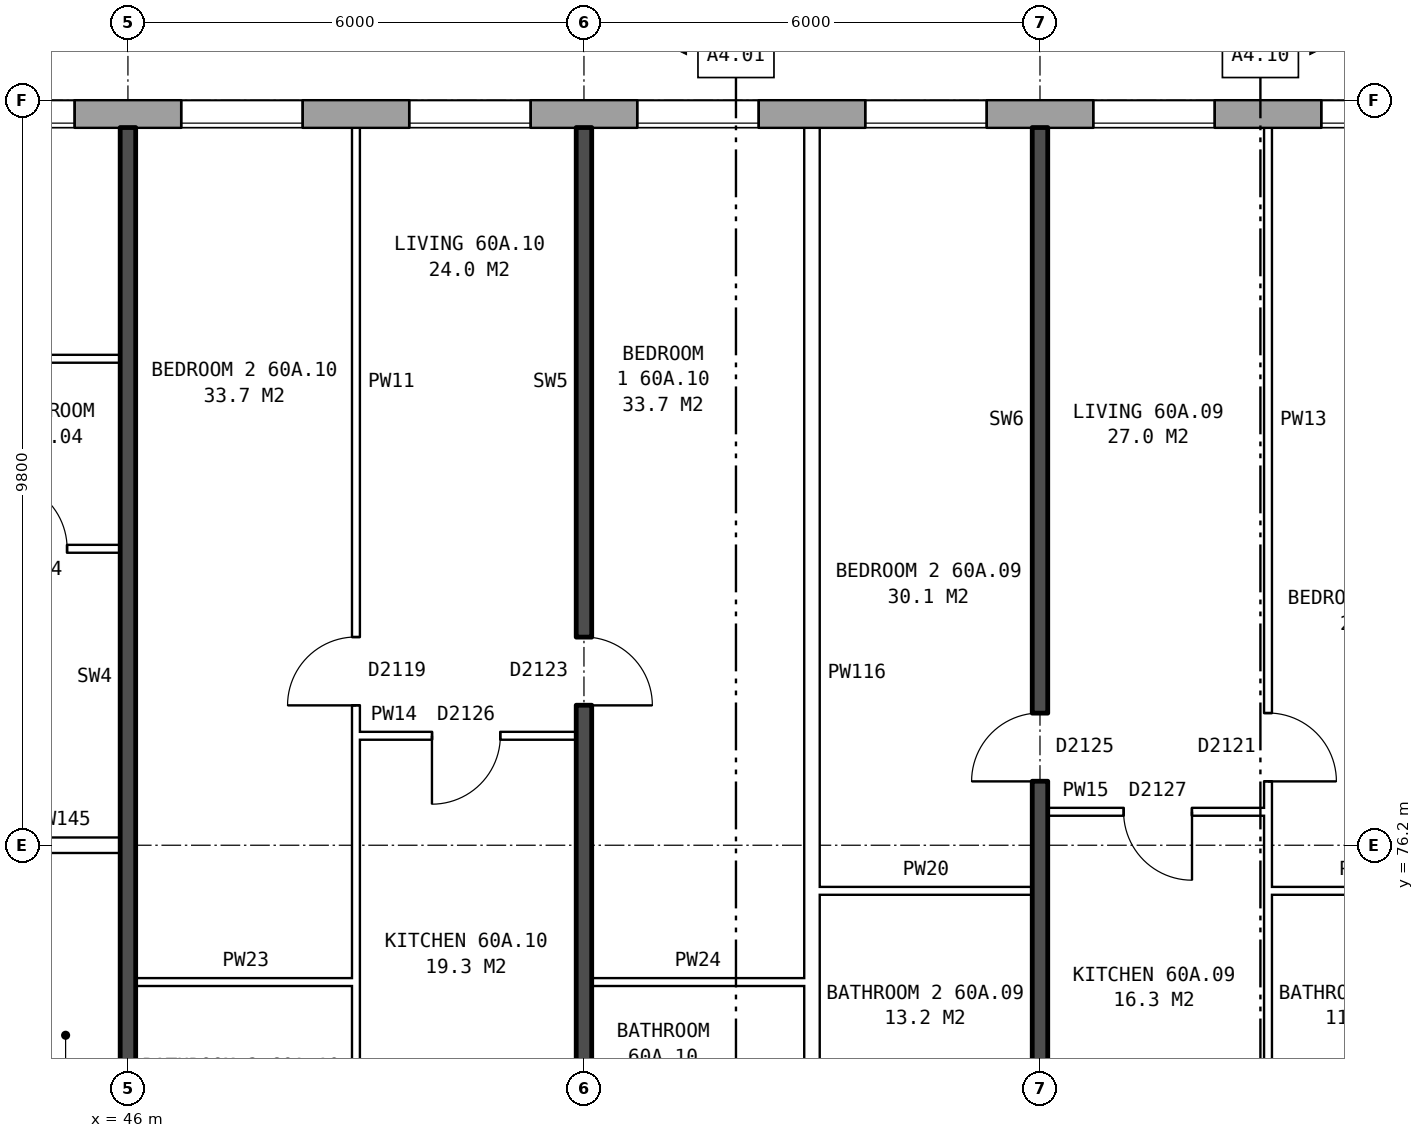
"""IFC4 building model, lengths in metres.
Left out: names, types, materials, properties, quantities, classifications, styles, units other than length and angle.
Written with IfcOpenShell. Run it as: python <this file> out.ifc"""

import sys

from ifc_helpers import new_model, si_unit, direction, frame, frame_2d, origin, place, context, subcontext, project, spatial, rectangle, extrude, element, fill, save


model = new_model("IFC4")
c1 = context("Model", 3, precision=1e-05, world=origin(), true_north=direction((0.0, 1.0)))
c2 = subcontext(c1, "Body", "Model", "MODEL_VIEW")
j1 = project(units=[si_unit("LENGTHUNIT", "METRE"), si_unit("PLANEANGLEUNIT", "RADIAN")], contexts=[c1])
p1 = place(None, origin())
s1 = spatial("IfcSite", under=j1, at=p1, CompositionType="ELEMENT")
p2 = place(p1, origin())
s2 = spatial("IfcBuilding", under=s1, at=p2, CompositionType="ELEMENT")
p3 = place(p2, frame((0.0, 0.0, 212.1)))
s3 = spatial("IfcBuildingStorey", under=s2, at=p3, CompositionType="ELEMENT", Elevation=212.1)
p4 = place(p3, frame((74.95, 85.82, 0.0), z_axis=(0.0, 0.0, 1.0), x_axis=(-1.0, 0.0, 0.0)))
e1 = element("IfcWall", 1, at=p4, inside=s3, PredefinedType="STANDARD", context=c2, shape_type="SweptSolid", body=[
    extrude(rectangle(XDim=39.875, YDim=0.36, at=frame_2d((19.938, 0.0))), origin(), (0.0, 0.0, 1.0), 2.85),
])
p5 = place(p4, frame((2.65, 0.0, 0.8)))
e2 = element("IfcOpeningElement", 2, at=p5, cuts=e1, PredefinedType="OPENING", context=c2, shape_type="SweptSolid", body=[
    extrude(rectangle(XDim=1.6, YDim=1.8, at=frame_2d((0.8, 0.9))), frame((0.0, 0.19, 0.0), z_axis=(0.0, -1.0, 0.0), x_axis=(1.0, 0.0, 0.0)), (0.0, 0.0, 1.0), 0.38),
])
p6 = place(p4, frame((5.15, 0.0, 1.5)))
e3 = element("IfcOpeningElement", 3, at=p6, cuts=e1, PredefinedType="OPENING", context=c2, shape_type="SweptSolid", body=[
    extrude(rectangle(XDim=0.6, YDim=0.9, at=frame_2d((0.3, 0.45))), frame((0.0, 0.19, 0.0), z_axis=(0.0, -1.0, 0.0), x_axis=(1.0, 0.0, 0.0)), (0.0, 0.0, 1.0), 0.38),
])
p7 = place(p4, frame((8.65, 0.0, 0.8)))
e4 = element("IfcOpeningElement", 4, at=p7, cuts=e1, PredefinedType="OPENING", context=c2, shape_type="SweptSolid", body=[
    extrude(rectangle(XDim=1.6, YDim=1.8, at=frame_2d((0.8, 0.9))), frame((0.0, 0.19, 0.0), z_axis=(0.0, -1.0, 0.0), x_axis=(1.0, 0.0, 0.0)), (0.0, 0.0, 1.0), 0.38),
])
p8 = place(p4, frame((11.65, 0.0, 0.8)))
e5 = element("IfcOpeningElement", 5, at=p8, cuts=e1, PredefinedType="OPENING", context=c2, shape_type="SweptSolid", body=[
    extrude(rectangle(XDim=1.6, YDim=1.8, at=frame_2d((0.8, 0.9))), frame((0.0, 0.19, 0.0), z_axis=(0.0, -1.0, 0.0), x_axis=(1.0, 0.0, 0.0)), (0.0, 0.0, 1.0), 0.38),
])
p9 = place(p4, frame((14.65, 0.0, 0.8)))
e6 = element("IfcOpeningElement", 6, at=p9, cuts=e1, PredefinedType="OPENING", context=c2, shape_type="SweptSolid", body=[
    extrude(rectangle(XDim=1.6, YDim=1.8, at=frame_2d((0.8, 0.9))), frame((0.0, 0.19, 0.0), z_axis=(0.0, -1.0, 0.0), x_axis=(1.0, 0.0, 0.0)), (0.0, 0.0, 1.0), 0.38),
])
p10 = place(p4, frame((17.65, 0.0, 0.8)))
e7 = element("IfcOpeningElement", 7, at=p10, cuts=e1, PredefinedType="OPENING", context=c2, shape_type="SweptSolid", body=[
    extrude(rectangle(XDim=1.6, YDim=1.8, at=frame_2d((0.8, 0.9))), frame((0.0, 0.19, 0.0), z_axis=(0.0, -1.0, 0.0), x_axis=(1.0, 0.0, 0.0)), (0.0, 0.0, 1.0), 0.38),
])
p11 = place(p4, frame((20.65, 0.0, 0.8)))
e8 = element("IfcOpeningElement", 8, at=p11, cuts=e1, PredefinedType="OPENING", context=c2, shape_type="SweptSolid", body=[
    extrude(rectangle(XDim=1.6, YDim=1.8, at=frame_2d((0.8, 0.9))), frame((0.0, 0.19, 0.0), z_axis=(0.0, -1.0, 0.0), x_axis=(1.0, 0.0, 0.0)), (0.0, 0.0, 1.0), 0.38),
])
p12 = place(p4, frame((23.65, 0.0, 0.8)))
e9 = element("IfcOpeningElement", 9, at=p12, cuts=e1, PredefinedType="OPENING", context=c2, shape_type="SweptSolid", body=[
    extrude(rectangle(XDim=1.6, YDim=1.8, at=frame_2d((0.8, 0.9))), frame((0.0, 0.19, 0.0), z_axis=(0.0, -1.0, 0.0), x_axis=(1.0, 0.0, 0.0)), (0.0, 0.0, 1.0), 0.38),
])
p13 = place(p4, frame((26.65, 0.0, 0.8)))
e10 = element("IfcOpeningElement", 10, at=p13, cuts=e1, PredefinedType="OPENING", context=c2, shape_type="SweptSolid", body=[
    extrude(rectangle(XDim=1.6, YDim=1.8, at=frame_2d((0.8, 0.9))), frame((0.0, 0.19, 0.0), z_axis=(0.0, -1.0, 0.0), x_axis=(1.0, 0.0, 0.0)), (0.0, 0.0, 1.0), 0.38),
])
p14 = place(p4, frame((29.65, 0.0, 0.8)))
e11 = element("IfcOpeningElement", 11, at=p14, cuts=e1, PredefinedType="OPENING", context=c2, shape_type="SweptSolid", body=[
    extrude(rectangle(XDim=1.6, YDim=1.8, at=frame_2d((0.8, 0.9))), frame((0.0, 0.19, 0.0), z_axis=(0.0, -1.0, 0.0), x_axis=(1.0, 0.0, 0.0)), (0.0, 0.0, 1.0), 0.38),
])
p15 = place(p4, frame((32.65, 0.0, 0.8)))
e12 = element("IfcOpeningElement", 12, at=p15, cuts=e1, PredefinedType="OPENING", context=c2, shape_type="SweptSolid", body=[
    extrude(rectangle(XDim=1.6, YDim=1.8, at=frame_2d((0.8, 0.9))), frame((0.0, 0.19, 0.0), z_axis=(0.0, -1.0, 0.0), x_axis=(1.0, 0.0, 0.0)), (0.0, 0.0, 1.0), 0.38),
])
p16 = place(p4, frame((36.35, 0.0, 1.1)))
e13 = element("IfcOpeningElement", 13, at=p16, cuts=e1, PredefinedType="OPENING", context=c2, shape_type="SweptSolid", body=[
    extrude(rectangle(XDim=0.8, YDim=1.5, at=frame_2d((0.4, 0.75))), frame((0.0, 0.19, 0.0), z_axis=(0.0, -1.0, 0.0), x_axis=(1.0, 0.0, 0.0)), (0.0, 0.0, 1.0), 0.38),
])
p17 = place(p4, frame((7.45, 0.0, 0.8)))
e14 = element("IfcOpeningElement", 14, at=p17, cuts=e1, PredefinedType="OPENING", context=c2, shape_type="SweptSolid", body=[
    extrude(rectangle(XDim=0.8, YDim=1.5, at=frame_2d((0.4, 0.75))), frame((0.0, 0.19, 0.0), z_axis=(0.0, -1.0, 0.0), x_axis=(1.0, 0.0, 0.0)), (0.0, 0.0, 1.0), 0.38),
])
p18 = place(p4, frame((37.45, 0.0, 0.8)))
e15 = element("IfcOpeningElement", 15, at=p18, cuts=e1, PredefinedType="OPENING", context=c2, shape_type="SweptSolid", body=[
    extrude(rectangle(XDim=1.4, YDim=1.8, at=frame_2d((0.7, 0.9))), frame((0.0, 0.19, 0.0), z_axis=(0.0, -1.0, 0.0), x_axis=(1.0, 0.0, 0.0)), (0.0, 0.0, 1.0), 0.38),
])
p19 = place(p3, frame((46.1, 74.4, 0.0), z_axis=(0.0, 0.0, 1.0), x_axis=(1.0, 0.0, 0.0)))
e16 = element("IfcWall", 16, at=p19, inside=s3, PredefinedType="PARTITIONING", context=c2, shape_type="SweptSolid", body=[
    extrude(rectangle(XDim=2.9, YDim=0.1, at=frame_2d((1.45, 0.0))), origin(), (0.0, 0.0, 1.0), 2.85),
])
for number, where, z_axis, x_axis in (
    (17, (52.1, 74.4, 0.0), (0.0, 0.0, 1.0), (1.0, 0.0, 0.0)),
    (18, (55.1, 75.6, 0.0), (0.0, 0.0, 1.0), (1.0, 0.0, 0.0)),
):
    element("IfcWall", number, at=place(p3, frame(where, z_axis=z_axis, x_axis=x_axis)), inside=s3, PredefinedType="PARTITIONING", context=c2, shape_type="SweptSolid", body=[
        extrude(rectangle(XDim=2.8, YDim=0.1, at=frame_2d((1.4, 0.0))), origin(), (0.0, 0.0, 1.0), 2.85),
    ])
p20 = place(p3, frame((61.0, 75.6, 0.0), z_axis=(0.0, 0.0, 1.0), x_axis=(1.0, 0.0, 0.0)))
e19 = element("IfcWall", 19, at=p20, inside=s3, PredefinedType="PARTITIONING", context=c2, shape_type="SweptSolid", body=[
    extrude(rectangle(XDim=2.64, YDim=0.1, at=frame_2d((1.32, 0.0))), origin(), (0.0, 0.0, 1.0), 2.85),
])
p21 = place(p3, frame((44.36, 76.2, 0.0), z_axis=(0.0, 0.0, 1.0), x_axis=(1.0, 0.0, 0.0)))
e20 = element("IfcWall", 20, at=p21, inside=s3, PredefinedType="PARTITIONING", context=c2, shape_type="SweptSolid", body=[
    extrude(rectangle(XDim=1.54, YDim=0.2, at=frame_2d((0.77, 0.0))), origin(), (0.0, 0.0, 1.0), 2.85),
])
p22 = place(p3, frame((58.1, 76.64, 0.0), z_axis=(0.0, 0.0, 1.0), x_axis=(1.0, 0.0, 0.0)))
e21 = element("IfcWall", 21, at=p22, inside=s3, PredefinedType="PARTITIONING", context=c2, shape_type="SweptSolid", body=[
    extrude(rectangle(XDim=2.9, YDim=0.1, at=frame_2d((1.45, 0.0))), origin(), (0.0, 0.0, 1.0), 2.85),
])
p23 = place(p22, frame((1.0, 0.0, 0.0)))
e22 = element("IfcOpeningElement", 22, at=p23, cuts=e21, PredefinedType="OPENING", context=c2, shape_type="SweptSolid", body=[
    extrude(rectangle(XDim=0.9, YDim=2.1, at=frame_2d((0.45, 1.05))), frame((0.0, 0.06, 0.0), z_axis=(0.0, -1.0, 0.0), x_axis=(1.0, 0.0, 0.0)), (0.0, 0.0, 1.0), 0.12),
])
p24 = place(p3, frame((49.0, 77.64, 0.0), z_axis=(0.0, 0.0, 1.0), x_axis=(1.0, 0.0, 0.0)))
e23 = element("IfcWall", 23, at=p24, inside=s3, PredefinedType="PARTITIONING", context=c2, shape_type="SweptSolid", body=[
    extrude(rectangle(XDim=2.9, YDim=0.1, at=frame_2d((1.45, 0.0))), origin(), (0.0, 0.0, 1.0), 2.85),
])
p25 = place(p24, frame((1.0, 0.0, 0.0)))
e24 = element("IfcOpeningElement", 24, at=p25, cuts=e23, PredefinedType="OPENING", context=c2, shape_type="SweptSolid", body=[
    extrude(rectangle(XDim=0.9, YDim=2.1, at=frame_2d((0.45, 1.05))), frame((0.0, 0.06, 0.0), z_axis=(0.0, -1.0, 0.0), x_axis=(1.0, 0.0, 0.0)), (0.0, 0.0, 1.0), 0.12),
])
p26 = place(p3, frame((40.1, 80.1, 0.0), z_axis=(0.0, 0.0, 1.0), x_axis=(1.0, 0.0, 0.0)))
e25 = element("IfcWall", 25, at=p26, inside=s3, PredefinedType="PARTITIONING", context=c2, shape_type="SweptSolid", body=[
    extrude(rectangle(XDim=5.8, YDim=0.1, at=frame_2d((2.9, 0.0))), origin(), (0.0, 0.0, 1.0), 2.85),
])
p27 = place(p26, frame((1.3, 0.0, 0.0)))
e26 = element("IfcOpeningElement", 26, at=p27, cuts=e25, PredefinedType="OPENING", context=c2, shape_type="SweptSolid", body=[
    extrude(rectangle(XDim=0.9, YDim=2.1, at=frame_2d((0.45, 1.05))), frame((0.0, 0.06, 0.0), z_axis=(0.0, -1.0, 0.0), x_axis=(1.0, 0.0, 0.0)), (0.0, 0.0, 1.0), 0.12),
])
p28 = place(p26, frame((4.2, 0.0, 0.0)))
e27 = element("IfcOpeningElement", 27, at=p28, cuts=e25, PredefinedType="OPENING", context=c2, shape_type="SweptSolid", body=[
    extrude(rectangle(XDim=0.9, YDim=2.1, at=frame_2d((0.45, 1.05))), frame((0.0, 0.06, 0.0), z_axis=(0.0, -1.0, 0.0), x_axis=(1.0, 0.0, 0.0)), (0.0, 0.0, 1.0), 0.12),
])
p29 = place(p3, frame((43.6, 82.6, 0.0), z_axis=(0.0, 0.0, 1.0), x_axis=(1.0, 0.0, 0.0)))
e28 = element("IfcWall", 28, at=p29, inside=s3, PredefinedType="PARTITIONING", context=c2, shape_type="SweptSolid", body=[
    extrude(rectangle(XDim=2.3, YDim=0.1, at=frame_2d((1.15, 0.0))), origin(), (0.0, 0.0, 1.0), 2.85),
])
p30 = place(p3, frame((46.0, 71.2, 0.0), z_axis=(0.0, 0.0, 1.0), x_axis=(0.0, 1.0, 0.0)))
e29 = element("IfcWall", 29, at=p30, inside=s3, PredefinedType="SOLIDWALL", context=c2, shape_type="SweptSolid", body=[
    extrude(rectangle(XDim=14.44, YDim=0.2, at=frame_2d((7.22, 0.0))), origin(), (0.0, 0.0, 1.0), 2.85),
])
p31 = place(p3, frame((49.0, 71.3, 0.0), z_axis=(0.0, 0.0, 1.0), x_axis=(0.0, 1.0, 0.0)))
e30 = element("IfcWall", 30, at=p31, inside=s3, PredefinedType="PARTITIONING", context=c2, shape_type="SweptSolid", body=[
    extrude(rectangle(XDim=14.34, YDim=0.1, at=frame_2d((7.17, 0.0))), origin(), (0.0, 0.0, 1.0), 2.85),
])
p32 = place(p31, frame((6.74, 0.0, 0.0)))
e31 = element("IfcOpeningElement", 31, at=p32, cuts=e30, PredefinedType="OPENING", context=c2, shape_type="SweptSolid", body=[
    extrude(rectangle(XDim=0.9, YDim=2.1, at=frame_2d((0.45, 1.05))), frame((0.0, 0.06, 0.0), z_axis=(0.0, -1.0, 0.0), x_axis=(1.0, 0.0, 0.0)), (0.0, 0.0, 1.0), 0.12),
])
p33 = place(p31, frame((0.4, 0.0, 0.0)))
e32 = element("IfcOpeningElement", 32, at=p33, cuts=e30, PredefinedType="OPENING", context=c2, shape_type="SweptSolid", body=[
    extrude(rectangle(XDim=0.9, YDim=2.1, at=frame_2d((0.45, 1.05))), frame((0.0, 0.06, 0.0), z_axis=(0.0, -1.0, 0.0), x_axis=(1.0, 0.0, 0.0)), (0.0, 0.0, 1.0), 0.12),
])
p34 = place(p3, frame((52.0, 71.2, 0.0), z_axis=(0.0, 0.0, 1.0), x_axis=(0.0, 1.0, 0.0)))
e33 = element("IfcWall", 33, at=p34, inside=s3, PredefinedType="SOLIDWALL", context=c2, shape_type="SweptSolid", body=[
    extrude(rectangle(XDim=14.44, YDim=0.2, at=frame_2d((7.22, 0.0))), origin(), (0.0, 0.0, 1.0), 2.85),
])
p35 = place(p34, frame((6.84, 0.0, 0.0)))
e34 = element("IfcOpeningElement", 34, at=p35, cuts=e33, PredefinedType="OPENING", context=c2, shape_type="SweptSolid", body=[
    extrude(rectangle(XDim=0.9, YDim=2.1, at=frame_2d((0.45, 1.05))), frame((0.0, 0.11, 0.0), z_axis=(0.0, -1.0, 0.0), x_axis=(1.0, 0.0, 0.0)), (0.0, 0.0, 1.0), 0.22),
])
p36 = place(p34, frame((0.4, 0.0, 0.0)))
e35 = element("IfcOpeningElement", 35, at=p36, cuts=e33, PredefinedType="OPENING", context=c2, shape_type="SweptSolid", body=[
    extrude(rectangle(XDim=0.9, YDim=2.1, at=frame_2d((0.45, 1.05))), frame((0.0, 0.11, 0.0), z_axis=(0.0, -1.0, 0.0), x_axis=(1.0, 0.0, 0.0)), (0.0, 0.0, 1.0), 0.22),
])
p37 = place(p3, frame((55.0, 71.3, 0.0), z_axis=(0.0, 0.0, 1.0), x_axis=(0.0, 1.0, 0.0)))
e36 = element("IfcWall", 36, at=p37, inside=s3, PredefinedType="PARTITIONING", context=c2, shape_type="SweptSolid", body=[
    extrude(rectangle(XDim=14.34, YDim=0.2, at=frame_2d((7.17, 0.0))), origin(), (0.0, 0.0, 1.0), 2.85),
])
p38 = place(p3, frame((58.0, 71.2, 0.0), z_axis=(0.0, 0.0, 1.0), x_axis=(0.0, 1.0, 0.0)))
e37 = element("IfcWall", 37, at=p38, inside=s3, PredefinedType="SOLIDWALL", context=c2, shape_type="SweptSolid", body=[
    extrude(rectangle(XDim=14.44, YDim=0.2, at=frame_2d((7.22, 0.0))), origin(), (0.0, 0.0, 1.0), 2.85),
])
p39 = place(p38, frame((5.84, 0.0, 0.0)))
e38 = element("IfcOpeningElement", 38, at=p39, cuts=e37, PredefinedType="OPENING", context=c2, shape_type="SweptSolid", body=[
    extrude(rectangle(XDim=0.9, YDim=2.1, at=frame_2d((0.45, 1.05))), frame((0.0, 0.11, 0.0), z_axis=(0.0, -1.0, 0.0), x_axis=(1.0, 0.0, 0.0)), (0.0, 0.0, 1.0), 0.22),
])
p40 = place(p38, frame((0.4, 0.0, 0.0)))
e39 = element("IfcOpeningElement", 39, at=p40, cuts=e37, PredefinedType="OPENING", context=c2, shape_type="SweptSolid", body=[
    extrude(rectangle(XDim=0.9, YDim=2.1, at=frame_2d((0.45, 1.05))), frame((0.0, 0.11, 0.0), z_axis=(0.0, -1.0, 0.0), x_axis=(1.0, 0.0, 0.0)), (0.0, 0.0, 1.0), 0.22),
])
p41 = place(p3, frame((61.0, 71.3, 0.0), z_axis=(0.0, 0.0, 1.0), x_axis=(0.0, 1.0, 0.0)))
e40 = element("IfcWall", 40, at=p41, inside=s3, PredefinedType="PARTITIONING", context=c2, shape_type="SweptSolid", body=[
    extrude(rectangle(XDim=14.34, YDim=0.1, at=frame_2d((7.17, 0.0))), origin(), (0.0, 0.0, 1.0), 2.85),
])
p42 = place(p41, frame((5.74, 0.0, 0.0)))
e41 = element("IfcOpeningElement", 41, at=p42, cuts=e40, PredefinedType="OPENING", context=c2, shape_type="SweptSolid", body=[
    extrude(rectangle(XDim=0.9, YDim=2.1, at=frame_2d((0.45, 1.05))), frame((0.0, 0.06, 0.0), z_axis=(0.0, -1.0, 0.0), x_axis=(1.0, 0.0, 0.0)), (0.0, 0.0, 1.0), 0.12),
])
p43 = place(p41, frame((0.4, 0.0, 0.0)))
e42 = element("IfcOpeningElement", 42, at=p43, cuts=e40, PredefinedType="OPENING", context=c2, shape_type="SweptSolid", body=[
    extrude(rectangle(XDim=0.9, YDim=2.1, at=frame_2d((0.45, 1.05))), frame((0.0, 0.06, 0.0), z_axis=(0.0, -1.0, 0.0), x_axis=(1.0, 0.0, 0.0)), (0.0, 0.0, 1.0), 0.12),
])
p44 = place(p8, origin())
e43 = element("IfcWindow", 43, at=p44, inside=s3, PartitioningType="SINGLE_PANEL", PredefinedType="WINDOW", context=c2, shape_type="SweptSolid", body=[
    extrude(rectangle(XDim=1.6, YDim=1.8, at=frame_2d((0.8, 0.9))), frame((0.0, 0.15, 0.0), z_axis=(0.0, -1.0, 0.0), x_axis=(1.0, 0.0, 0.0)), (0.0, 0.0, 1.0), 0.06),
])
fill(e5, e43)
p45 = place(p9, origin())
e44 = element("IfcWindow", 44, at=p45, inside=s3, PartitioningType="SINGLE_PANEL", PredefinedType="WINDOW", context=c2, shape_type="SweptSolid", body=[
    extrude(rectangle(XDim=1.6, YDim=1.8, at=frame_2d((0.8, 0.9))), frame((0.0, 0.15, 0.0), z_axis=(0.0, -1.0, 0.0), x_axis=(1.0, 0.0, 0.0)), (0.0, 0.0, 1.0), 0.06),
])
fill(e6, e44)
p46 = place(p10, origin())
e45 = element("IfcWindow", 45, at=p46, inside=s3, PartitioningType="SINGLE_PANEL", PredefinedType="WINDOW", context=c2, shape_type="SweptSolid", body=[
    extrude(rectangle(XDim=1.6, YDim=1.8, at=frame_2d((0.8, 0.9))), frame((0.0, 0.15, 0.0), z_axis=(0.0, -1.0, 0.0), x_axis=(1.0, 0.0, 0.0)), (0.0, 0.0, 1.0), 0.06),
])
fill(e7, e45)
p47 = place(p11, origin())
e46 = element("IfcWindow", 46, at=p47, inside=s3, PartitioningType="SINGLE_PANEL", PredefinedType="WINDOW", context=c2, shape_type="SweptSolid", body=[
    extrude(rectangle(XDim=1.6, YDim=1.8, at=frame_2d((0.8, 0.9))), frame((0.0, 0.15, 0.0), z_axis=(0.0, -1.0, 0.0), x_axis=(1.0, 0.0, 0.0)), (0.0, 0.0, 1.0), 0.06),
])
fill(e8, e46)
p48 = place(p12, origin())
e47 = element("IfcWindow", 47, at=p48, inside=s3, PartitioningType="SINGLE_PANEL", PredefinedType="WINDOW", context=c2, shape_type="SweptSolid", body=[
    extrude(rectangle(XDim=1.6, YDim=1.8, at=frame_2d((0.8, 0.9))), frame((0.0, 0.15, 0.0), z_axis=(0.0, -1.0, 0.0), x_axis=(1.0, 0.0, 0.0)), (0.0, 0.0, 1.0), 0.06),
])
fill(e9, e47)
p49 = place(p13, origin())
e48 = element("IfcWindow", 48, at=p49, inside=s3, PartitioningType="SINGLE_PANEL", PredefinedType="WINDOW", context=c2, shape_type="SweptSolid", body=[
    extrude(rectangle(XDim=1.6, YDim=1.8, at=frame_2d((0.8, 0.9))), frame((0.0, 0.15, 0.0), z_axis=(0.0, -1.0, 0.0), x_axis=(1.0, 0.0, 0.0)), (0.0, 0.0, 1.0), 0.06),
])
fill(e10, e48)
p50 = place(p14, origin())
e49 = element("IfcWindow", 49, at=p50, inside=s3, PartitioningType="SINGLE_PANEL", PredefinedType="WINDOW", context=c2, shape_type="SweptSolid", body=[
    extrude(rectangle(XDim=1.6, YDim=1.8, at=frame_2d((0.8, 0.9))), frame((0.0, 0.15, 0.0), z_axis=(0.0, -1.0, 0.0), x_axis=(1.0, 0.0, 0.0)), (0.0, 0.0, 1.0), 0.06),
])
fill(e11, e49)
p51 = place(p28, origin())
e50 = element("IfcDoor", 50, at=p51, inside=s3, OperationType="SINGLE_SWING_LEFT", PredefinedType="DOOR", context=c2, shape_type="SweptSolid", body=[
    extrude(rectangle(XDim=0.9, YDim=2.1, at=frame_2d((0.45, 1.05))), frame((0.0, 0.025, 0.0), z_axis=(0.0, -1.0, 0.0), x_axis=(1.0, 0.0, 0.0)), (0.0, 0.0, 1.0), 0.05),
])
fill(e27, e50)
p52 = place(p42, frame((0.9, 0.0, 0.0), z_axis=(0.0, 0.0, 1.0), x_axis=(-1.0, 0.0, 0.0)))
e51 = element("IfcDoor", 51, at=p52, inside=s3, OperationType="SINGLE_SWING_RIGHT", PredefinedType="DOOR", context=c2, shape_type="SweptSolid", body=[
    extrude(rectangle(XDim=0.9, YDim=2.1, at=frame_2d((0.45, 1.05))), frame((0.0, 0.025, 0.0), z_axis=(0.0, -1.0, 0.0), x_axis=(1.0, 0.0, 0.0)), (0.0, 0.0, 1.0), 0.05),
])
fill(e41, e51)
p53 = place(p39, origin())
e52 = element("IfcDoor", 52, at=p53, inside=s3, OperationType="SINGLE_SWING_LEFT", PredefinedType="DOOR", context=c2, shape_type="SweptSolid", body=[
    extrude(rectangle(XDim=0.9, YDim=2.1, at=frame_2d((0.45, 1.05))), frame((0.0, 0.025, 0.0), z_axis=(0.0, -1.0, 0.0), x_axis=(1.0, 0.0, 0.0)), (0.0, 0.0, 1.0), 0.05),
])
fill(e38, e52)
p54 = place(p23, frame((0.9, 0.0, 0.0), z_axis=(0.0, 0.0, 1.0), x_axis=(-1.0, 0.0, 0.0)))
e53 = element("IfcDoor", 53, at=p54, inside=s3, OperationType="SINGLE_SWING_LEFT", PredefinedType="DOOR", context=c2, shape_type="SweptSolid", body=[
    extrude(rectangle(XDim=0.9, YDim=2.1, at=frame_2d((0.45, 1.05))), frame((0.0, 0.025, 0.0), z_axis=(0.0, -1.0, 0.0), x_axis=(1.0, 0.0, 0.0)), (0.0, 0.0, 1.0), 0.05),
])
fill(e22, e53)
p55 = place(p35, frame((0.9, 0.0, 0.0), z_axis=(0.0, 0.0, 1.0), x_axis=(-1.0, 0.0, 0.0)))
e54 = element("IfcDoor", 54, at=p55, inside=s3, OperationType="SINGLE_SWING_RIGHT", PredefinedType="DOOR", context=c2, shape_type="SweptSolid", body=[
    extrude(rectangle(XDim=0.9, YDim=2.1, at=frame_2d((0.45, 1.05))), frame((0.0, 0.025, 0.0), z_axis=(0.0, -1.0, 0.0), x_axis=(1.0, 0.0, 0.0)), (0.0, 0.0, 1.0), 0.05),
])
fill(e34, e54)
p56 = place(p32, origin())
e55 = element("IfcDoor", 55, at=p56, inside=s3, OperationType="SINGLE_SWING_LEFT", PredefinedType="DOOR", context=c2, shape_type="SweptSolid", body=[
    extrude(rectangle(XDim=0.9, YDim=2.1, at=frame_2d((0.45, 1.05))), frame((0.0, 0.025, 0.0), z_axis=(0.0, -1.0, 0.0), x_axis=(1.0, 0.0, 0.0)), (0.0, 0.0, 1.0), 0.05),
])
fill(e31, e55)
p57 = place(p25, frame((0.9, 0.0, 0.0), z_axis=(0.0, 0.0, 1.0), x_axis=(-1.0, 0.0, 0.0)))
e56 = element("IfcDoor", 56, at=p57, inside=s3, OperationType="SINGLE_SWING_RIGHT", PredefinedType="DOOR", context=c2, shape_type="SweptSolid", body=[
    extrude(rectangle(XDim=0.9, YDim=2.1, at=frame_2d((0.45, 1.05))), frame((0.0, 0.025, 0.0), z_axis=(0.0, -1.0, 0.0), x_axis=(1.0, 0.0, 0.0)), (0.0, 0.0, 1.0), 0.05),
])
fill(e24, e56)
save(model, sys.argv[1])
